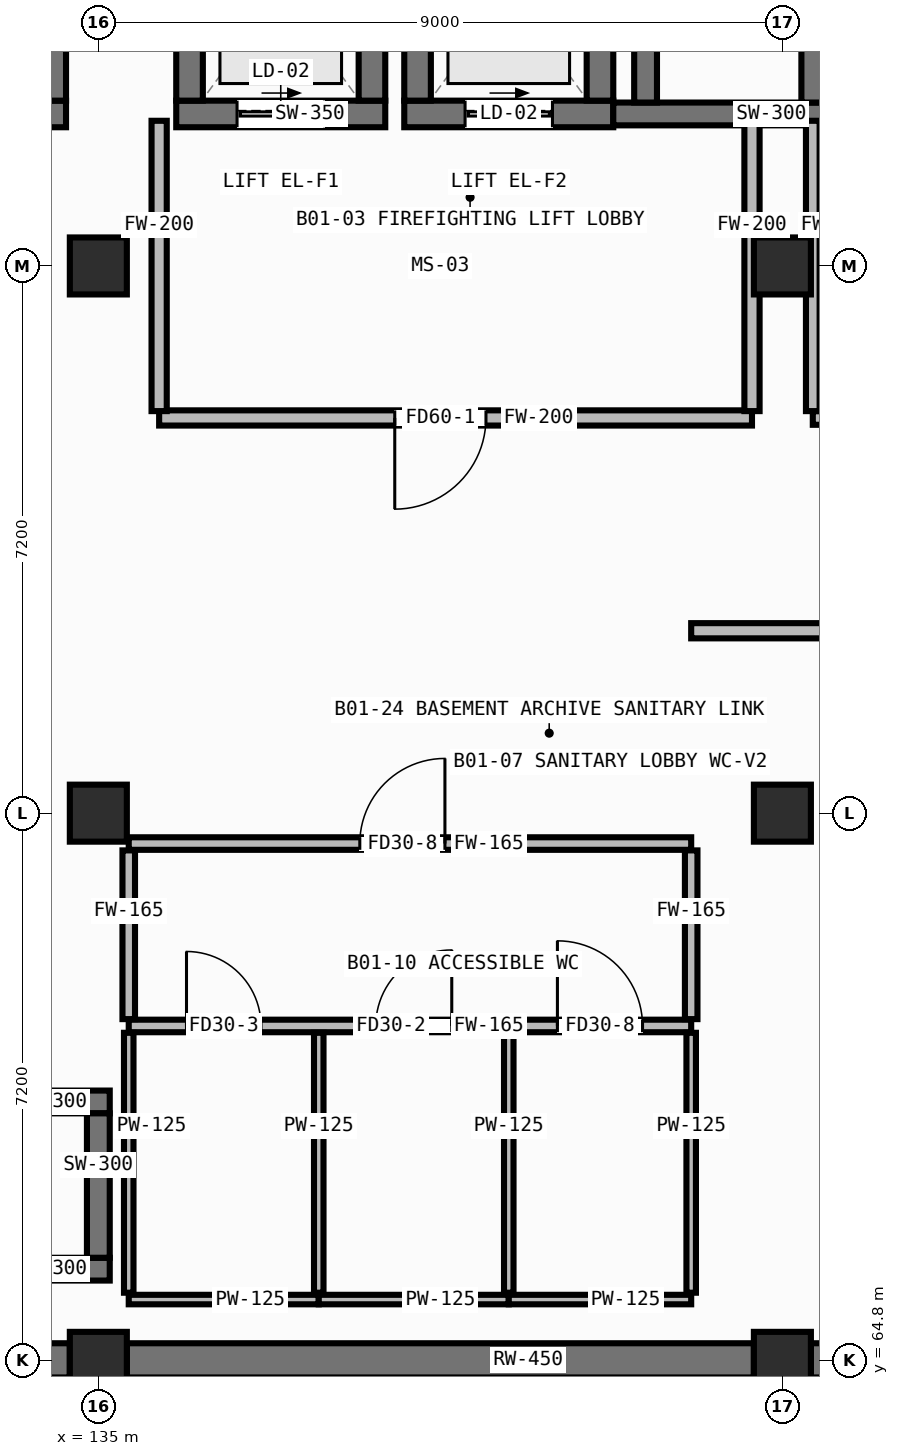
"""IFC4 building model, lengths in metres.
Left out: names, types, materials, properties, quantities, classifications, styles, units other than length and angle.
Written with IfcOpenShell. Run it as: python <this file> out.ifc"""

import sys

from ifc_helpers import new_model, si_unit, direction, frame, frame_2d, origin, origin_2d, place, context, subcontext, project, spatial, rectangle, hollow_rectangle, extrude, element, fill, save


model = new_model("IFC4")
c1 = context("Model", 3, precision=1e-05, world=origin(), true_north=direction((0.0, 1.0)))
c2 = subcontext(c1, "Body", "Model", "MODEL_VIEW")
j1 = project(units=[si_unit("LENGTHUNIT", "METRE"), si_unit("PLANEANGLEUNIT", "RADIAN")], contexts=[c1])
p1 = place(None, origin())
s1 = spatial("IfcSite", under=j1, at=p1, CompositionType="ELEMENT")
p2 = place(p1, origin())
s2 = spatial("IfcBuilding", under=s1, at=p2, CompositionType="ELEMENT")
p3 = place(p2, frame((0.0, 0.0, -4.9)))
s3 = spatial("IfcBuildingStorey", under=s2, at=p3, CompositionType="ELEMENT", Elevation=-4.9)
for number, where, z_axis, x_axis in (
    (1, (135.0, 64.8, 0.0), (0.0, 0.0, 1.0), (1.0, 0.0, 0.0)),
    (2, (135.0, 72.0, 0.0), (0.0, 0.0, 1.0), (1.0, 0.0, 0.0)),
    (3, (135.0, 79.2, 0.0), (0.0, 0.0, 1.0), (1.0, 0.0, 0.0)),
    (4, (144.0, 64.8, 0.0), (0.0, 0.0, 1.0), (1.0, 0.0, 0.0)),
    (5, (144.0, 72.0, 0.0), (0.0, 0.0, 1.0), (1.0, 0.0, 0.0)),
    (6, (144.0, 79.2, 0.0), (0.0, 0.0, 1.0), (1.0, 0.0, 0.0)),
):
    element("IfcColumn", number, at=place(p3, frame(where, z_axis=z_axis, x_axis=x_axis)), inside=s3, PredefinedType="COLUMN", context=c2, shape_type="SweptSolid", body=[
        extrude(hollow_rectangle(XDim=0.75, YDim=0.75, WallThickness=0.032, at=origin_2d()), origin(), (0.0, 0.0, 1.0), 4.9),
    ])
for number, where, z_axis, x_axis in (
    (7, (126.375, 64.8, 0.0), (0.0, 0.0, 1.0), (1.0, 0.0, 0.0)),
    (8, (135.375, 64.8, 0.0), (0.0, 0.0, 1.0), (1.0, 0.0, 0.0)),
    (9, (144.375, 64.8, 0.0), (0.0, 0.0, 1.0), (1.0, 0.0, 0.0)),
):
    element("IfcWall", number, at=place(p3, frame(where, z_axis=z_axis, x_axis=x_axis)), inside=s3, PredefinedType="SOLIDWALL", context=c2, shape_type="SweptSolid", body=[
        extrude(rectangle(XDim=8.25, YDim=0.45, at=frame_2d((4.125, 0.0))), origin(), (0.0, 0.0, 1.0), 3.975),
    ])
p4 = place(p3, frame((126.425, 81.2, 0.0), z_axis=(0.0, 0.0, 1.0), x_axis=(1.0, 0.0, 0.0)))
e10 = element("IfcWall", 10, at=p4, inside=s3, PredefinedType="SHEAR", context=c2, shape_type="SweptSolid", body=[
    extrude(rectangle(XDim=8.15, YDim=0.35, at=frame_2d((4.075, 0.0))), origin(), (0.0, 0.0, 1.0), 4.625),
])
p5 = place(p4, frame((0.525, 0.0, 0.0)))
e11 = element("IfcOpeningElement", 11, at=p5, cuts=e10, PredefinedType="OPENING", context=c2, shape_type="SweptSolid", body=[
    extrude(rectangle(XDim=1.15, YDim=2.1, at=frame_2d((0.575, 1.05))), frame((0.0, 0.187, 0.0), z_axis=(0.0, -1.0, 0.0), x_axis=(1.0, 0.0, 0.0)), (0.0, 0.0, 1.0), 0.374),
])
p6 = place(p3, frame((134.4, 81.375, 0.0), z_axis=(0.0, 0.0, 1.0), x_axis=(0.0, 1.0, 0.0)))
e12 = element("IfcWall", 12, at=p6, inside=s3, PredefinedType="SHEAR", context=c2, shape_type="SweptSolid", body=[
    extrude(rectangle(XDim=3.55, YDim=0.35, at=frame_2d((1.775, 0.0))), origin(), (0.0, 0.0, 1.0), 4.625),
])
p7 = place(p3, frame((136.025, 81.2, 0.0), z_axis=(0.0, 0.0, 1.0), x_axis=(1.0, 0.0, 0.0)))
e13 = element("IfcWall", 13, at=p7, inside=s3, PredefinedType="SHEAR", context=c2, shape_type="SweptSolid", body=[
    extrude(rectangle(XDim=2.75, YDim=0.35, at=frame_2d((1.375, 0.0))), origin(), (0.0, 0.0, 1.0), 4.625),
])
p8 = place(p7, frame((0.8, 0.0, 0.0)))
e14 = element("IfcOpeningElement", 14, at=p8, cuts=e13, PredefinedType="OPENING", context=c2, shape_type="SweptSolid", body=[
    extrude(rectangle(XDim=1.15, YDim=2.12, at=frame_2d((0.575, 1.06))), frame((0.0, 0.187, 0.0), z_axis=(0.0, -1.0, 0.0), x_axis=(1.0, 0.0, 0.0)), (0.0, 0.0, 1.0), 0.374),
])
for number, where, z_axis, x_axis in (
    (15, (136.2, 81.375, 0.0), (0.0, 0.0, 1.0), (0.0, 1.0, 0.0)),
    (16, (138.6, 81.375, 0.0), (0.0, 0.0, 1.0), (0.0, 1.0, 0.0)),
):
    element("IfcWall", number, at=place(p3, frame(where, z_axis=z_axis, x_axis=x_axis)), inside=s3, PredefinedType="SHEAR", context=c2, shape_type="SweptSolid", body=[
        extrude(rectangle(XDim=2.85, YDim=0.35, at=frame_2d((1.425, 0.0))), origin(), (0.0, 0.0, 1.0), 4.625),
    ])
p9 = place(p3, frame((139.025, 81.2, 0.0), z_axis=(0.0, 0.0, 1.0), x_axis=(1.0, 0.0, 0.0)))
e17 = element("IfcWall", 17, at=p9, inside=s3, PredefinedType="SHEAR", context=c2, shape_type="SweptSolid", body=[
    extrude(rectangle(XDim=2.75, YDim=0.35, at=frame_2d((1.375, 0.0))), origin(), (0.0, 0.0, 1.0), 4.625),
])
p10 = place(p9, frame((0.8, 0.0, 0.0)))
e18 = element("IfcOpeningElement", 18, at=p10, cuts=e17, PredefinedType="OPENING", context=c2, shape_type="SweptSolid", body=[
    extrude(rectangle(XDim=1.15, YDim=2.12, at=frame_2d((0.575, 1.06))), frame((0.0, 0.187, 0.0), z_axis=(0.0, -1.0, 0.0), x_axis=(1.0, 0.0, 0.0)), (0.0, 0.0, 1.0), 0.374),
])
for number, where, z_axis, x_axis in (
    (19, (139.2, 81.375, 0.0), (0.0, 0.0, 1.0), (0.0, 1.0, 0.0)),
    (20, (141.6, 81.375, 0.0), (0.0, 0.0, 1.0), (0.0, 1.0, 0.0)),
):
    element("IfcWall", number, at=place(p3, frame(where, z_axis=z_axis, x_axis=x_axis)), inside=s3, PredefinedType="SHEAR", context=c2, shape_type="SweptSolid", body=[
        extrude(rectangle(XDim=2.85, YDim=0.35, at=frame_2d((1.425, 0.0))), origin(), (0.0, 0.0, 1.0), 4.625),
    ])
p11 = place(p3, frame((141.775, 81.2, 0.0), z_axis=(0.0, 0.0, 1.0), x_axis=(1.0, 0.0, 0.0)))
e21 = element("IfcWall", 21, at=p11, inside=s3, PredefinedType="SHEAR", context=c2, shape_type="SweptSolid", body=[
    extrude(rectangle(XDim=3.25, YDim=0.3, at=frame_2d((1.625, 0.0))), origin(), (0.0, 0.0, 1.0), 4.625),
])
for number, where, z_axis, x_axis in (
    (22, (142.2, 81.35, 0.0), (0.0, 0.0, 1.0), (0.0, 1.0, 0.0)),
    (23, (144.4, 81.35, 0.0), (0.0, 0.0, 1.0), (0.0, 1.0, 0.0)),
    (24, (133.05, 66.0, 0.0), (0.0, 0.0, 1.0), (1.0, 0.0, 0.0)),
    (25, (133.05, 68.2, 0.0), (0.0, 0.0, 1.0), (1.0, 0.0, 0.0)),
):
    element("IfcWall", number, at=place(p3, frame(where, z_axis=z_axis, x_axis=x_axis)), inside=s3, PredefinedType="SHEAR", context=c2, shape_type="SweptSolid", body=[
        extrude(rectangle(XDim=2.1, YDim=0.3, at=frame_2d((1.05, 0.0))), origin(), (0.0, 0.0, 1.0), 4.625),
    ])
p12 = place(p3, frame((135.0, 66.15, 0.0), z_axis=(0.0, 0.0, 1.0), x_axis=(0.0, 1.0, 0.0)))
e26 = element("IfcWall", 26, at=p12, inside=s3, PredefinedType="SHEAR", context=c2, shape_type="SweptSolid", body=[
    extrude(rectangle(XDim=1.9, YDim=0.3, at=frame_2d((0.95, 0.0))), origin(), (0.0, 0.0, 1.0), 4.625),
])
p13 = place(p3, frame((135.8, 77.2, 0.0), z_axis=(0.0, 0.0, 1.0), x_axis=(1.0, 0.0, 0.0)))
e27 = element("IfcWall", 27, at=p13, inside=s3, PredefinedType="PARTITIONING", context=c2, shape_type="SweptSolid", body=[
    extrude(rectangle(XDim=7.8, YDim=0.2, at=frame_2d((3.9, 0.0))), origin(), (0.0, 0.0, 1.0), 4.625),
])
p14 = place(p13, frame((3.1, 0.0, 0.0)))
e28 = element("IfcOpeningElement", 28, at=p14, cuts=e27, PredefinedType="OPENING", context=c2, shape_type="SweptSolid", body=[
    extrude(rectangle(XDim=1.2, YDim=2.1, at=frame_2d((0.6, 1.05))), frame((0.0, 0.112, 0.0), z_axis=(0.0, -1.0, 0.0), x_axis=(1.0, 0.0, 0.0)), (0.0, 0.0, 1.0), 0.224),
])
for number, where, z_axis, x_axis in (
    (29, (135.8, 77.29, 0.0), (0.0, 0.0, 1.0), (0.0, 1.0, 0.0)),
    (30, (143.6, 77.29, 0.0), (0.0, 0.0, 1.0), (0.0, 1.0, 0.0)),
):
    element("IfcWall", number, at=place(p3, frame(where, z_axis=z_axis, x_axis=x_axis)), inside=s3, PredefinedType="PARTITIONING", context=c2, shape_type="SweptSolid", body=[
        extrude(rectangle(XDim=3.82, YDim=0.2, at=frame_2d((1.91, 0.0))), origin(), (0.0, 0.0, 1.0), 4.625),
    ])
p15 = place(p3, frame((144.4, 77.2, 0.0), z_axis=(0.0, 0.0, 1.0), x_axis=(1.0, 0.0, 0.0)))
e31 = element("IfcWall", 31, at=p15, inside=s3, PredefinedType="PARTITIONING", context=c2, shape_type="SweptSolid", body=[
    extrude(rectangle(XDim=8.2, YDim=0.18, at=frame_2d((4.1, 0.0))), origin(), (0.0, 0.0, 1.0), 4.625),
])
p16 = place(p15, frame((3.54, 0.0, 0.0)))
e32 = element("IfcOpeningElement", 32, at=p16, cuts=e31, PredefinedType="OPENING", context=c2, shape_type="SweptSolid", body=[
    extrude(rectangle(XDim=1.12, YDim=2.08, at=frame_2d((0.56, 1.04))), frame((0.0, 0.102, 0.0), z_axis=(0.0, -1.0, 0.0), x_axis=(1.0, 0.0, 0.0)), (0.0, 0.0, 1.0), 0.204),
])
p17 = place(p3, frame((144.4, 77.29, 0.0), z_axis=(0.0, 0.0, 1.0), x_axis=(0.0, 1.0, 0.0)))
e33 = element("IfcWall", 33, at=p17, inside=s3, PredefinedType="PARTITIONING", context=c2, shape_type="SweptSolid", body=[
    extrude(rectangle(XDim=3.82, YDim=0.18, at=frame_2d((1.91, 0.0))), origin(), (0.0, 0.0, 1.0), 4.625),
])
p18 = place(p3, frame((135.4, 69.2, 0.0), z_axis=(0.0, 0.0, 1.0), x_axis=(1.0, 0.0, 0.0)))
e34 = element("IfcWall", 34, at=p18, inside=s3, PredefinedType="PARTITIONING", context=c2, shape_type="SweptSolid", body=[
    extrude(rectangle(XDim=7.4, YDim=0.165, at=frame_2d((3.7, 0.0))), origin(), (0.0, 0.0, 1.0), 4.625),
])
p19 = place(p18, frame((0.76, 0.0, 0.0)))
e35 = element("IfcOpeningElement", 35, at=p19, cuts=e34, PredefinedType="OPENING", context=c2, shape_type="SweptSolid", body=[
    extrude(rectangle(XDim=0.98, YDim=2.02, at=frame_2d((0.49, 1.01))), frame((0.0, 0.094, 0.0), z_axis=(0.0, -1.0, 0.0), x_axis=(1.0, 0.0, 0.0)), (0.0, 0.0, 1.0), 0.189),
])
p20 = place(p18, frame((3.25, 0.0, 0.0)))
e36 = element("IfcOpeningElement", 36, at=p20, cuts=e34, PredefinedType="OPENING", context=c2, shape_type="SweptSolid", body=[
    extrude(rectangle(XDim=1.0, YDim=2.08, at=frame_2d((0.5, 1.04))), frame((0.0, 0.094, 0.0), z_axis=(0.0, -1.0, 0.0), x_axis=(1.0, 0.0, 0.0)), (0.0, 0.0, 1.0), 0.189),
])
p21 = place(p18, frame((5.64, 0.0, 0.0)))
e37 = element("IfcOpeningElement", 37, at=p21, cuts=e34, PredefinedType="OPENING", context=c2, shape_type="SweptSolid", body=[
    extrude(rectangle(XDim=1.12, YDim=2.08, at=frame_2d((0.56, 1.04))), frame((0.0, 0.094, 0.0), z_axis=(0.0, -1.0, 0.0), x_axis=(1.0, 0.0, 0.0)), (0.0, 0.0, 1.0), 0.189),
])
p22 = place(p3, frame((135.4, 71.6, 0.0), z_axis=(0.0, 0.0, 1.0), x_axis=(1.0, 0.0, 0.0)))
e38 = element("IfcWall", 38, at=p22, inside=s3, PredefinedType="PARTITIONING", context=c2, shape_type="SweptSolid", body=[
    extrude(rectangle(XDim=7.4, YDim=0.165, at=frame_2d((3.7, 0.0))), origin(), (0.0, 0.0, 1.0), 4.625),
])
p23 = place(p22, frame((3.04, 0.0, 0.0)))
e39 = element("IfcOpeningElement", 39, at=p23, cuts=e38, PredefinedType="OPENING", context=c2, shape_type="SweptSolid", body=[
    extrude(rectangle(XDim=1.12, YDim=2.08, at=frame_2d((0.56, 1.04))), frame((0.0, 0.094, 0.0), z_axis=(0.0, -1.0, 0.0), x_axis=(1.0, 0.0, 0.0)), (0.0, 0.0, 1.0), 0.189),
])
for number, where, z_axis, x_axis in (
    (40, (135.4, 69.29, 0.0), (0.0, 0.0, 1.0), (0.0, 1.0, 0.0)),
    (41, (142.8, 69.29, 0.0), (0.0, 0.0, 1.0), (0.0, 1.0, 0.0)),
):
    element("IfcWall", number, at=place(p3, frame(where, z_axis=z_axis, x_axis=x_axis)), inside=s3, PredefinedType="PARTITIONING", context=c2, shape_type="SweptSolid", body=[
        extrude(rectangle(XDim=2.22, YDim=0.165, at=frame_2d((1.11, 0.0))), origin(), (0.0, 0.0, 1.0), 4.625),
    ])
p24 = place(p3, frame((135.4, 65.6, 0.0), z_axis=(0.0, 0.0, 1.0), x_axis=(1.0, 0.0, 0.0)))
e42 = element("IfcWall", 42, at=p24, inside=s3, PredefinedType="PARTITIONING", context=c2, shape_type="SweptSolid", body=[
    extrude(rectangle(XDim=2.5, YDim=0.125, at=frame_2d((1.25, 0.0))), origin(), (0.0, 0.0, 1.0), 4.625),
])
for number, where, z_axis, x_axis in (
    (43, (135.4, 65.69, 0.0), (0.0, 0.0, 1.0), (0.0, 1.0, 0.0)),
    (44, (137.9, 65.69, 0.0), (0.0, 0.0, 1.0), (0.0, 1.0, 0.0)),
):
    element("IfcWall", number, at=place(p3, frame(where, z_axis=z_axis, x_axis=x_axis)), inside=s3, PredefinedType="PARTITIONING", context=c2, shape_type="SweptSolid", body=[
        extrude(rectangle(XDim=3.42, YDim=0.125, at=frame_2d((1.71, 0.0))), origin(), (0.0, 0.0, 1.0), 4.625),
    ])
p25 = place(p3, frame((137.9, 65.6, 0.0), z_axis=(0.0, 0.0, 1.0), x_axis=(1.0, 0.0, 0.0)))
e45 = element("IfcWall", 45, at=p25, inside=s3, PredefinedType="PARTITIONING", context=c2, shape_type="SweptSolid", body=[
    extrude(rectangle(XDim=2.5, YDim=0.125, at=frame_2d((1.25, 0.0))), origin(), (0.0, 0.0, 1.0), 4.625),
])
p26 = place(p3, frame((140.4, 65.69, 0.0), z_axis=(0.0, 0.0, 1.0), x_axis=(0.0, 1.0, 0.0)))
e46 = element("IfcWall", 46, at=p26, inside=s3, PredefinedType="PARTITIONING", context=c2, shape_type="SweptSolid", body=[
    extrude(rectangle(XDim=3.42, YDim=0.125, at=frame_2d((1.71, 0.0))), origin(), (0.0, 0.0, 1.0), 4.625),
])
p27 = place(p3, frame((140.4, 65.6, 0.0), z_axis=(0.0, 0.0, 1.0), x_axis=(1.0, 0.0, 0.0)))
e47 = element("IfcWall", 47, at=p27, inside=s3, PredefinedType="PARTITIONING", context=c2, shape_type="SweptSolid", body=[
    extrude(rectangle(XDim=2.4, YDim=0.125, at=frame_2d((1.2, 0.0))), origin(), (0.0, 0.0, 1.0), 4.625),
])
p28 = place(p3, frame((142.8, 65.69, 0.0), z_axis=(0.0, 0.0, 1.0), x_axis=(0.0, 1.0, 0.0)))
e48 = element("IfcWall", 48, at=p28, inside=s3, PredefinedType="PARTITIONING", context=c2, shape_type="SweptSolid", body=[
    extrude(rectangle(XDim=3.42, YDim=0.125, at=frame_2d((1.71, 0.0))), origin(), (0.0, 0.0, 1.0), 4.625),
])
p29 = place(p3, frame((142.8, 74.4, 0.0), z_axis=(0.0, 0.0, 1.0), x_axis=(1.0, 0.0, 0.0)))
e49 = element("IfcWall", 49, at=p29, inside=s3, PredefinedType="PARTITIONING", context=c2, shape_type="SweptSolid", body=[
    extrude(rectangle(XDim=18.97, YDim=0.2, at=frame_2d((9.485, 0.0))), origin(), (0.0, 0.0, 1.0), 4.625),
])
p30 = place(p29, frame((5.1, 0.0, 0.0)))
e50 = element("IfcOpeningElement", 50, at=p30, cuts=e49, PredefinedType="OPENING", context=c2, shape_type="SweptSolid", body=[
    extrude(rectangle(XDim=1.2, YDim=2.1, at=frame_2d((0.6, 1.05))), frame((0.0, 0.112, 0.0), z_axis=(0.0, -1.0, 0.0), x_axis=(1.0, 0.0, 0.0)), (0.0, 0.0, 1.0), 0.224),
])
p31 = place(p8, origin())
e51 = element("IfcDoor", 51, at=p31, inside=s3, OperationType="SLIDING_TO_LEFT", PredefinedType="DOOR", context=c2, shape_type="SweptSolid", body=[
    extrude(rectangle(XDim=1.15, YDim=2.12, at=frame_2d((0.575, 1.06))), frame((0.0, 0.025, 0.0), z_axis=(0.0, -1.0, 0.0), x_axis=(1.0, 0.0, 0.0)), (0.0, 0.0, 1.0), 0.05),
])
fill(e14, e51)
p32 = place(p10, origin())
e52 = element("IfcDoor", 52, at=p32, inside=s3, OperationType="SLIDING_TO_LEFT", PredefinedType="DOOR", context=c2, shape_type="SweptSolid", body=[
    extrude(rectangle(XDim=1.15, YDim=2.12, at=frame_2d((0.575, 1.06))), frame((0.0, 0.025, 0.0), z_axis=(0.0, -1.0, 0.0), x_axis=(1.0, 0.0, 0.0)), (0.0, 0.0, 1.0), 0.05),
])
fill(e18, e52)
p33 = place(p14, frame((1.2, 0.0, 0.0), z_axis=(0.0, 0.0, 1.0), x_axis=(-1.0, 0.0, 0.0)))
e53 = element("IfcDoor", 53, at=p33, inside=s3, OperationType="SINGLE_SWING_RIGHT", PredefinedType="DOOR", context=c2, shape_type="SweptSolid", body=[
    extrude(rectangle(XDim=1.2, YDim=2.1, at=frame_2d((0.6, 1.05))), frame((0.0, 0.025, 0.0), z_axis=(0.0, -1.0, 0.0), x_axis=(1.0, 0.0, 0.0)), (0.0, 0.0, 1.0), 0.05),
])
fill(e28, e53)
p34 = place(p23, origin())
e54 = element("IfcDoor", 54, at=p34, inside=s3, OperationType="SINGLE_SWING_RIGHT", PredefinedType="DOOR", context=c2, shape_type="SweptSolid", body=[
    extrude(rectangle(XDim=1.12, YDim=2.08, at=frame_2d((0.56, 1.04))), frame((0.0, 0.025, 0.0), z_axis=(0.0, -1.0, 0.0), x_axis=(1.0, 0.0, 0.0)), (0.0, 0.0, 1.0), 0.05),
])
fill(e39, e54)
p35 = place(p19, origin())
e55 = element("IfcDoor", 55, at=p35, inside=s3, OperationType="SINGLE_SWING_LEFT", PredefinedType="DOOR", context=c2, shape_type="SweptSolid", body=[
    extrude(rectangle(XDim=0.98, YDim=2.02, at=frame_2d((0.49, 1.01))), frame((0.0, 0.025, 0.0), z_axis=(0.0, -1.0, 0.0), x_axis=(1.0, 0.0, 0.0)), (0.0, 0.0, 1.0), 0.05),
])
fill(e35, e55)
p36 = place(p20, origin())
e56 = element("IfcDoor", 56, at=p36, inside=s3, OperationType="SINGLE_SWING_RIGHT", PredefinedType="DOOR", context=c2, shape_type="SweptSolid", body=[
    extrude(rectangle(XDim=1.0, YDim=2.08, at=frame_2d((0.5, 1.04))), frame((0.0, 0.025, 0.0), z_axis=(0.0, -1.0, 0.0), x_axis=(1.0, 0.0, 0.0)), (0.0, 0.0, 1.0), 0.05),
])
fill(e36, e56)
p37 = place(p21, origin())
e57 = element("IfcDoor", 57, at=p37, inside=s3, OperationType="SINGLE_SWING_LEFT", PredefinedType="DOOR", context=c2, shape_type="SweptSolid", body=[
    extrude(rectangle(XDim=1.12, YDim=2.08, at=frame_2d((0.56, 1.04))), frame((0.0, 0.025, 0.0), z_axis=(0.0, -1.0, 0.0), x_axis=(1.0, 0.0, 0.0)), (0.0, 0.0, 1.0), 0.05),
])
fill(e37, e57)
save(model, sys.argv[1])
